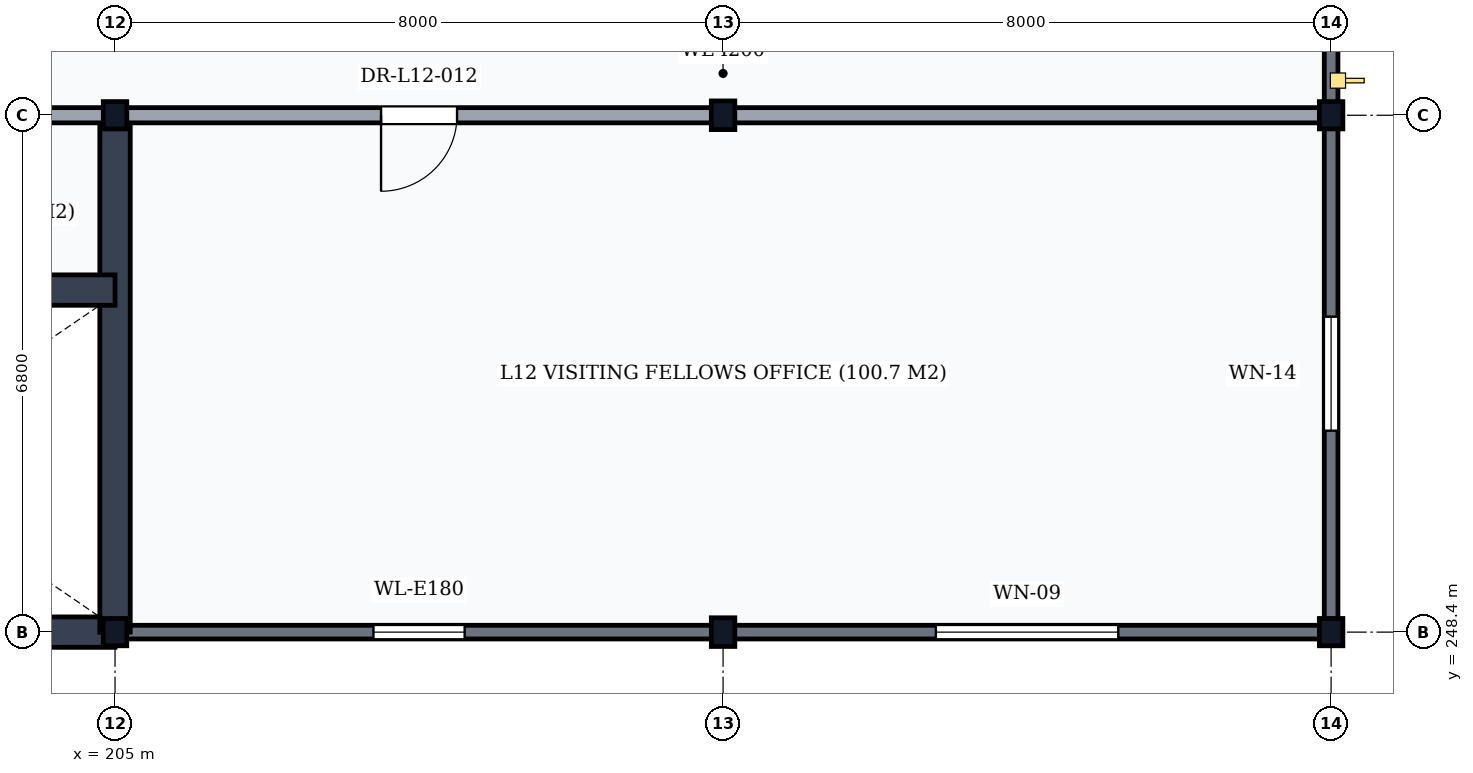
"""IFC4 building model, lengths in metres.
Left out: names, types, materials, properties, quantities, classifications, styles, units other than length and angle.
Written with IfcOpenShell. Run it as: python <this file> out.ifc"""

import sys

from ifc_helpers import new_model, si_unit, direction, frame, frame_2d, origin, origin_2d, place, context, subcontext, project, spatial, rectangle, i_section, extrude, element, fill, save


model = new_model("IFC4")
c1 = context("Model", 3, precision=1e-05, world=origin(), true_north=direction((0.0, 1.0)))
c2 = subcontext(c1, "Body", "Model", "MODEL_VIEW")
j1 = project(units=[si_unit("LENGTHUNIT", "METRE"), si_unit("PLANEANGLEUNIT", "RADIAN")], contexts=[c1])
p1 = place(None, origin())
s1 = spatial("IfcSite", under=j1, at=p1, CompositionType="ELEMENT")
p2 = place(p1, origin())
s2 = spatial("IfcBuilding", under=s1, at=p2, CompositionType="ELEMENT")
p3 = place(p2, frame((0.0, 0.0, 47.7)))
s3 = spatial("IfcBuildingStorey", under=s2, at=p3, CompositionType="ELEMENT", Elevation=47.7)
for number, where, z_axis, x_axis in (
    (1, (205.0, 248.4, 0.0), (0.0, 0.0, 1.0), (1.0, 0.0, 0.0)),
    (2, (205.0, 255.2, 0.0), (0.0, 0.0, 1.0), (1.0, 0.0, 0.0)),
):
    element("IfcColumn", number, at=place(p3, frame(where, z_axis=z_axis, x_axis=x_axis)), inside=s3, PredefinedType="COLUMN", context=c2, shape_type="SweptSolid", body=[
        extrude(i_section(OverallWidth=0.309, OverallDepth=0.359, WebThickness=0.021, FlangeThickness=0.04, FilletRadius=0.027, at=origin_2d()), origin(), (0.0, 0.0, 1.0), 3.9),
    ])
for number, where, z_axis, x_axis in (
    (3, (213.0, 248.4, 0.0), (0.0, 0.0, 1.0), (1.0, 0.0, 0.0)),
    (4, (213.0, 255.2, 0.0), (0.0, 0.0, 1.0), (1.0, 0.0, 0.0)),
):
    element("IfcColumn", number, at=place(p3, frame(where, z_axis=z_axis, x_axis=x_axis)), inside=s3, PredefinedType="COLUMN", context=c2, shape_type="SweptSolid", body=[
        extrude(i_section(OverallWidth=0.309, OverallDepth=0.377, WebThickness=0.021, FlangeThickness=0.04, FilletRadius=0.027, at=origin_2d()), origin(), (0.0, 0.0, 1.0), 3.9),
    ])
for number, where, z_axis, x_axis in (
    (5, (221.0, 248.4, 0.0), (0.0, 0.0, 1.0), (1.0, 0.0, 0.0)),
    (6, (221.0, 255.2, 0.0), (0.0, 0.0, 1.0), (1.0, 0.0, 0.0)),
):
    element("IfcColumn", number, at=place(p3, frame(where, z_axis=z_axis, x_axis=x_axis)), inside=s3, PredefinedType="COLUMN", context=c2, shape_type="SweptSolid", body=[
        extrude(i_section(OverallWidth=0.309, OverallDepth=0.359, WebThickness=0.021, FlangeThickness=0.04, FilletRadius=0.027, at=origin_2d()), origin(), (0.0, 0.0, 1.0), 3.9),
    ])
p4 = place(p3, frame((205.006, 248.4, 0.0), z_axis=(0.0, 0.0, 1.0), x_axis=(1.0, 0.0, 0.0)))
e7 = element("IfcWall", 7, at=p4, inside=s3, PredefinedType="SOLIDWALL", context=c2, shape_type="SweptSolid", body=[
    extrude(rectangle(XDim=7.988, YDim=0.18, at=frame_2d((3.994, 0.0))), origin(), (0.0, 0.0, 1.0), 3.298),
])
p5 = place(p4, frame((3.394, 0.0, 0.95)))
e8 = element("IfcOpeningElement", 8, at=p5, cuts=e7, PredefinedType="OPENING", context=c2, shape_type="SweptSolid", body=[
    extrude(rectangle(XDim=1.2, YDim=1.8, at=frame_2d((0.6, 0.9))), frame((0.0, 0.105, 0.0), z_axis=(0.0, -1.0, 0.0), x_axis=(1.0, 0.0, 0.0)), (0.0, 0.0, 1.0), 0.21),
])
p6 = place(p3, frame((213.006, 248.4, 0.0), z_axis=(0.0, 0.0, 1.0), x_axis=(1.0, 0.0, 0.0)))
e9 = element("IfcWall", 9, at=p6, inside=s3, PredefinedType="SOLIDWALL", context=c2, shape_type="SweptSolid", body=[
    extrude(rectangle(XDim=7.988, YDim=0.18, at=frame_2d((3.994, 0.0))), origin(), (0.0, 0.0, 1.0), 3.298),
])
p7 = place(p6, frame((2.794, 0.0, 0.95)))
e10 = element("IfcOpeningElement", 10, at=p7, cuts=e9, PredefinedType="OPENING", context=c2, shape_type="SweptSolid", body=[
    extrude(rectangle(XDim=2.4, YDim=2.2, at=frame_2d((1.2, 1.1))), frame((0.0, 0.105, 0.0), z_axis=(0.0, -1.0, 0.0), x_axis=(1.0, 0.0, 0.0)), (0.0, 0.0, 1.0), 0.21),
])
p8 = place(p3, frame((221.0, 248.406, 0.0), z_axis=(0.0, 0.0, 1.0), x_axis=(0.0, 1.0, 0.0)))
e11 = element("IfcWall", 11, at=p8, inside=s3, PredefinedType="SOLIDWALL", context=c2, shape_type="SweptSolid", body=[
    extrude(rectangle(XDim=6.788, YDim=0.18, at=frame_2d((3.394, 0.0))), origin(), (0.0, 0.0, 1.0), 3.378),
])
p9 = place(p8, frame((2.644, 0.0, 0.95)))
e12 = element("IfcOpeningElement", 12, at=p9, cuts=e11, PredefinedType="OPENING", context=c2, shape_type="SweptSolid", body=[
    extrude(rectangle(XDim=1.5, YDim=1.9, at=frame_2d((0.75, 0.95))), frame((0.0, 0.105, 0.0), z_axis=(0.0, -1.0, 0.0), x_axis=(1.0, 0.0, 0.0)), (0.0, 0.0, 1.0), 0.21),
])
p10 = place(p3, frame((221.0, 255.206, 0.0), z_axis=(0.0, 0.0, 1.0), x_axis=(0.0, 1.0, 0.0)))
e13 = element("IfcWall", 13, at=p10, inside=s3, PredefinedType="SOLIDWALL", context=c2, shape_type="SweptSolid", body=[
    extrude(rectangle(XDim=7.588, YDim=0.18, at=frame_2d((3.794, 0.0))), origin(), (0.0, 0.0, 1.0), 3.338),
])
p11 = place(p10, frame((4.391, 0.0, 0.95)))
e14 = element("IfcOpeningElement", 14, at=p11, cuts=e13, PredefinedType="OPENING", context=c2, shape_type="SweptSolid", body=[
    extrude(rectangle(XDim=1.35, YDim=1.8, at=frame_2d((0.675, 0.9))), frame((0.0, 0.105, 0.0), z_axis=(0.0, -1.0, 0.0), x_axis=(1.0, 0.0, 0.0)), (0.0, 0.0, 1.0), 0.21),
])
p12 = place(p3, frame((197.0, 248.4, 0.0), z_axis=(0.0, 0.0, 1.0), x_axis=(1.0, 0.0, 0.0)))
e15 = element("IfcWall", 15, at=p12, inside=s3, PredefinedType="SHEAR", context=c2, shape_type="SweptSolid", body=[
    extrude(rectangle(XDim=8.0, YDim=0.4, at=frame_2d((4.0, 0.0))), origin(), (0.0, 0.0, 1.0), 3.61),
])
p13 = place(p3, frame((205.0, 248.4, 0.0), z_axis=(0.0, 0.0, 1.0), x_axis=(0.0, 1.0, 0.0)))
e16 = element("IfcWall", 16, at=p13, inside=s3, PredefinedType="SHEAR", context=c2, shape_type="SweptSolid", body=[
    extrude(rectangle(XDim=6.8, YDim=0.4, at=frame_2d((3.4, 0.0))), origin(), (0.0, 0.0, 1.0), 3.61),
])
p14 = place(p3, frame((197.0, 252.9, 0.0), z_axis=(0.0, 0.0, 1.0), x_axis=(1.0, 0.0, 0.0)))
e17 = element("IfcWall", 17, at=p14, inside=s3, PredefinedType="SHEAR", context=c2, shape_type="SweptSolid", body=[
    extrude(rectangle(XDim=8.0, YDim=0.4, at=frame_2d((4.0, 0.0))), origin(), (0.0, 0.0, 1.0), 3.61),
])
p15 = place(p14, frame((0.3, 0.0, 0.0)))
e18 = element("IfcOpeningElement", 18, at=p15, cuts=e17, PredefinedType="OPENING", context=c2, shape_type="SweptSolid", body=[
    extrude(rectangle(XDim=1.15, YDim=2.15, at=frame_2d((0.575, 1.075))), frame((0.0, 0.215, 0.0), z_axis=(0.0, -1.0, 0.0), x_axis=(1.0, 0.0, 0.0)), (0.0, 0.0, 1.0), 0.43),
])
p16 = place(p3, frame((197.0, 255.2, 0.0), z_axis=(0.0, 0.0, 1.0), x_axis=(1.0, 0.0, 0.0)))
e19 = element("IfcWall", 19, at=p16, inside=s3, PredefinedType="PARTITIONING", context=c2, shape_type="SweptSolid", body=[
    extrude(rectangle(XDim=8.0, YDim=0.2, at=frame_2d((4.0, 0.0))), origin(), (0.0, 0.0, 1.0), 3.108),
])
p17 = place(p16, frame((3.275, 0.0, 0.0)))
e20 = element("IfcOpeningElement", 20, at=p17, cuts=e19, PredefinedType="OPENING", context=c2, shape_type="SweptSolid", body=[
    extrude(rectangle(XDim=1.45, YDim=2.2, at=frame_2d((0.725, 1.1))), frame((0.0, 0.115, 0.0), z_axis=(0.0, -1.0, 0.0), x_axis=(1.0, 0.0, 0.0)), (0.0, 0.0, 1.0), 0.23),
])
p18 = place(p3, frame((205.0, 255.2, 0.0), z_axis=(0.0, 0.0, 1.0), x_axis=(1.0, 0.0, 0.0)))
e21 = element("IfcWall", 21, at=p18, inside=s3, PredefinedType="PARTITIONING", context=c2, shape_type="SweptSolid", body=[
    extrude(rectangle(XDim=16.0, YDim=0.2, at=frame_2d((8.0, 0.0))), origin(), (0.0, 0.0, 1.0), 3.108),
])
p19 = place(p18, frame((3.5, 0.0, 0.0)))
e22 = element("IfcOpeningElement", 22, at=p19, cuts=e21, PredefinedType="OPENING", context=c2, shape_type="SweptSolid", body=[
    extrude(rectangle(XDim=1.0, YDim=2.1, at=frame_2d((0.5, 1.05))), frame((0.0, 0.115, 0.0), z_axis=(0.0, -1.0, 0.0), x_axis=(1.0, 0.0, 0.0)), (0.0, 0.0, 1.0), 0.23),
])
p20 = place(p5, origin())
e23 = element("IfcWindow", 23, at=p20, inside=s3, PartitioningType="SINGLE_PANEL", PredefinedType="WINDOW", context=c2, shape_type="SweptSolid", body=[
    extrude(rectangle(XDim=1.2, YDim=1.8, at=frame_2d((0.6, 0.9))), frame((0.0, 0.03, 0.0), z_axis=(0.0, -1.0, 0.0), x_axis=(1.0, 0.0, 0.0)), (0.0, 0.0, 1.0), 0.06),
])
fill(e8, e23)
p21 = place(p7, origin())
e24 = element("IfcWindow", 24, at=p21, inside=s3, PartitioningType="DOUBLE_PANEL_VERTICAL", PredefinedType="WINDOW", context=c2, shape_type="SweptSolid", body=[
    extrude(rectangle(XDim=2.4, YDim=2.2, at=frame_2d((1.2, 1.1))), frame((0.0, 0.03, 0.0), z_axis=(0.0, -1.0, 0.0), x_axis=(1.0, 0.0, 0.0)), (0.0, 0.0, 1.0), 0.06),
])
fill(e10, e24)
p22 = place(p9, origin())
e25 = element("IfcWindow", 25, at=p22, inside=s3, PartitioningType="SINGLE_PANEL", PredefinedType="WINDOW", context=c2, shape_type="SweptSolid", body=[
    extrude(rectangle(XDim=1.5, YDim=1.9, at=frame_2d((0.75, 0.95))), frame((0.0, 0.03, 0.0), z_axis=(0.0, -1.0, 0.0), x_axis=(1.0, 0.0, 0.0)), (0.0, 0.0, 1.0), 0.06),
])
fill(e12, e25)
p23 = place(p19, frame((1.0, 0.0, 0.0), z_axis=(0.0, 0.0, 1.0), x_axis=(-1.0, 0.0, 0.0)))
e26 = element("IfcDoor", 26, at=p23, inside=s3, OperationType="SINGLE_SWING_RIGHT", PredefinedType="DOOR", context=c2, shape_type="SweptSolid", body=[
    extrude(rectangle(XDim=1.0, YDim=2.1, at=frame_2d((0.5, 1.05))), frame((0.0, 0.025, 0.0), z_axis=(0.0, -1.0, 0.0), x_axis=(1.0, 0.0, 0.0)), (0.0, 0.0, 1.0), 0.05),
])
fill(e22, e26)
save(model, sys.argv[1])
